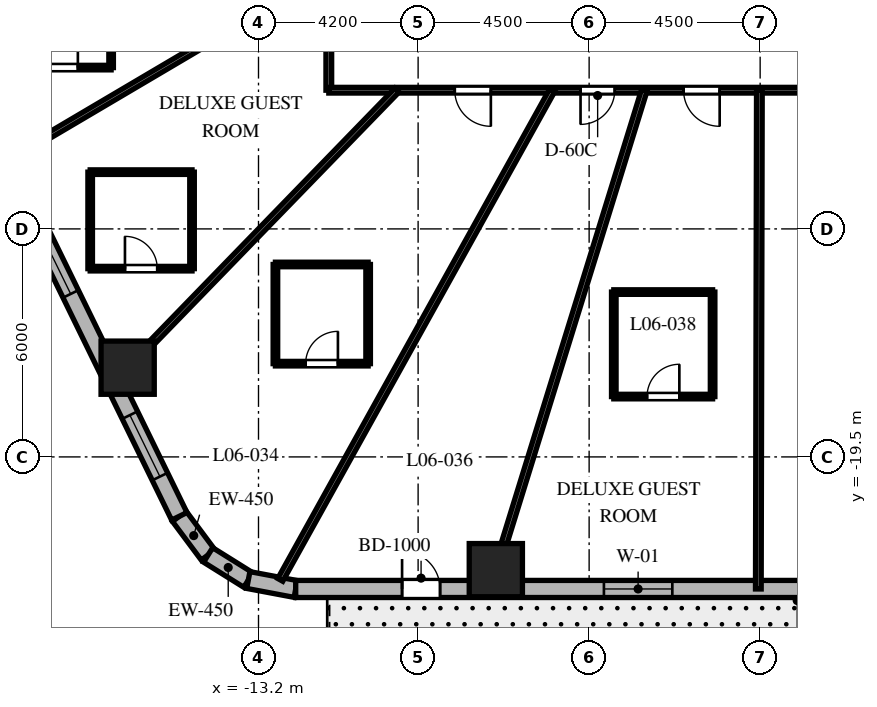
"""IFC4 building model, lengths in metres.
Left out: names, types, materials, properties, quantities, classifications, styles, units other than length and angle.
Written with IfcOpenShell. Run it as: python <this file> out.ifc"""

import sys

from ifc_helpers import new_model, si_unit, direction, frame, frame_2d, origin, origin_2d, place, context, subcontext, project, spatial, rectangle, extrude, element, fill, save


model = new_model("IFC4")
c1 = context("Model", 3, precision=1e-05, world=origin(), true_north=direction((0.0, 1.0)))
c2 = subcontext(c1, "Body", "Model", "MODEL_VIEW")
j1 = project(units=[si_unit("LENGTHUNIT", "METRE"), si_unit("PLANEANGLEUNIT", "RADIAN")], contexts=[c1])
p1 = place(None, origin())
s1 = spatial("IfcSite", under=j1, at=p1, CompositionType="ELEMENT")
p2 = place(p1, origin())
s2 = spatial("IfcBuilding", under=s1, at=p2, CompositionType="ELEMENT")
p3 = place(p2, frame((0.0, 0.0, 34.2)))
s3 = spatial("IfcBuildingStorey", under=s2, at=p3, CompositionType="ELEMENT", Elevation=34.2)
for number, where, z_axis, x_axis in (
    (1, (-6.955, -22.48, 0.0), (0.0, 0.0, 1.0), (1.0, 0.0, 0.0)),
    (2, (-16.643, -17.152, 0.0), (0.0, 0.0, 1.0), (1.0, 0.0, 0.0)),
):
    element("IfcColumn", number, at=place(p3, frame(where, z_axis=z_axis, x_axis=x_axis)), inside=s3, PredefinedType="COLUMN", context=c2, shape_type="SweptSolid", body=[
        extrude(rectangle(XDim=1.4, YDim=1.4, at=origin_2d()), origin(), (0.0, 0.0, 1.0), 3.7),
    ])
p4 = place(p3, frame((-15.284, -21.062, 0.0), z_axis=(0.0, 0.0, 1.0), x_axis=(0.597595366449, -0.801797841104, 0.0)))
e3 = element("IfcWall", 3, at=p4, inside=s3, PredefinedType="SOLIDWALL", context=c2, shape_type="SweptSolid", body=[
    extrude(rectangle(XDim=1.269, YDim=0.45, at=frame_2d((0.634, 0.0))), origin(), (0.0, 0.0, 1.0), 3.4),
])
p5 = place(p3, frame((-14.526, -22.08, 0.0), z_axis=(0.0, 0.0, 1.0), x_axis=(0.848185203596, -0.529699783275, 0.0)))
e4 = element("IfcWall", 4, at=p5, inside=s3, PredefinedType="SOLIDWALL", context=c2, shape_type="SweptSolid", body=[
    extrude(rectangle(XDim=1.247, YDim=0.45, at=frame_2d((0.624, 0.0))), origin(), (0.0, 0.0, 1.0), 3.4),
])
p6 = place(p3, frame((-13.468, -22.74, 0.0), z_axis=(0.0, 0.0, 1.0), x_axis=(0.982717174228, -0.185113358451, 0.0)))
e5 = element("IfcWall", 5, at=p6, inside=s3, PredefinedType="SOLIDWALL", context=c2, shape_type="SweptSolid", body=[
    extrude(rectangle(XDim=1.269, YDim=0.45, at=frame_2d((0.634, 0.0))), origin(), (0.0, 0.0, 1.0), 3.4),
])
p7 = place(p3, frame((-12.221, -22.975, 0.0), z_axis=(0.0, 0.0, 1.0), x_axis=(1.0, 0.0, 0.0)))
e6 = element("IfcWall", 6, at=p7, inside=s3, PredefinedType="SOLIDWALL", context=c2, shape_type="SweptSolid", body=[
    extrude(rectangle(XDim=26.389, YDim=0.45, at=frame_2d((13.195, 0.0))), origin(), (0.0, 0.0, 1.0), 3.4),
])
p8 = place(p7, frame((2.799, 0.0, 0.0)))
e7 = element("IfcOpeningElement", 7, at=p8, cuts=e6, PredefinedType="OPENING", context=c2, shape_type="SweptSolid", body=[
    extrude(rectangle(XDim=1.0, YDim=2.15, at=frame_2d((0.5, 1.075))), frame((0.0, 0.235, 0.0), z_axis=(0.0, -1.0, 0.0), x_axis=(1.0, 0.0, 0.0)), (0.0, 0.0, 1.0), 0.47),
])
p9 = place(p7, frame((8.11, 0.0, 0.8)))
e8 = element("IfcOpeningElement", 8, at=p9, cuts=e6, PredefinedType="OPENING", context=c2, shape_type="SweptSolid", body=[
    extrude(rectangle(XDim=1.8, YDim=1.8, at=frame_2d((0.9, 0.9))), frame((0.0, 0.235, 0.0), z_axis=(0.0, -1.0, 0.0), x_axis=(1.0, 0.0, 0.0)), (0.0, 0.0, 1.0), 0.47),
])
p10 = place(p7, frame((15.46, 0.0, 0.8)))
e9 = element("IfcOpeningElement", 9, at=p10, cuts=e6, PredefinedType="OPENING", context=c2, shape_type="SweptSolid", body=[
    extrude(rectangle(XDim=1.8, YDim=1.8, at=frame_2d((0.9, 0.9))), frame((0.0, 0.235, 0.0), z_axis=(0.0, -1.0, 0.0), x_axis=(1.0, 0.0, 0.0)), (0.0, 0.0, 1.0), 0.47),
])
p11 = place(p7, frame((22.938, 0.0, 0.8)))
e10 = element("IfcOpeningElement", 10, at=p11, cuts=e6, PredefinedType="OPENING", context=c2, shape_type="SweptSolid", body=[
    extrude(rectangle(XDim=1.8, YDim=1.8, at=frame_2d((0.9, 0.9))), frame((0.0, 0.235, 0.0), z_axis=(0.0, -1.0, 0.0), x_axis=(1.0, 0.0, 0.0)), (0.0, 0.0, 1.0), 0.47),
])
p12 = place(p3, frame((-24.336, -2.532, 0.0), z_axis=(0.0, 0.0, 1.0), x_axis=(0.438931326393, -0.898520612291, 0.0)))
e11 = element("IfcWall", 11, at=p12, inside=s3, PredefinedType="SOLIDWALL", context=c2, shape_type="SweptSolid", body=[
    extrude(rectangle(XDim=20.623, YDim=0.45, at=frame_2d((10.312, 0.0))), origin(), (0.0, 0.0, 1.0), 3.4),
])
p13 = place(p12, frame((1.214, 0.0, 0.8)))
e12 = element("IfcOpeningElement", 12, at=p13, cuts=e11, PredefinedType="OPENING", context=c2, shape_type="SweptSolid", body=[
    extrude(rectangle(XDim=1.8, YDim=1.8, at=frame_2d((0.9, 0.9))), frame((0.0, 0.235, 0.0), z_axis=(0.0, -1.0, 0.0), x_axis=(1.0, 0.0, 0.0)), (0.0, 0.0, 1.0), 0.47),
])
p14 = place(p12, frame((6.47, 0.0, 0.8)))
e13 = element("IfcOpeningElement", 13, at=p14, cuts=e11, PredefinedType="OPENING", context=c2, shape_type="SweptSolid", body=[
    extrude(rectangle(XDim=1.8, YDim=1.8, at=frame_2d((0.9, 0.9))), frame((0.0, 0.235, 0.0), z_axis=(0.0, -1.0, 0.0), x_axis=(1.0, 0.0, 0.0)), (0.0, 0.0, 1.0), 0.47),
])
p15 = place(p12, frame((12.311, 0.0, 0.8)))
e14 = element("IfcOpeningElement", 14, at=p15, cuts=e11, PredefinedType="OPENING", context=c2, shape_type="SweptSolid", body=[
    extrude(rectangle(XDim=1.8, YDim=1.8, at=frame_2d((0.9, 0.9))), frame((0.0, 0.235, 0.0), z_axis=(0.0, -1.0, 0.0), x_axis=(1.0, 0.0, 0.0)), (0.0, 0.0, 1.0), 0.47),
])
p16 = place(p12, frame((17.66, 0.0, 0.8)))
e15 = element("IfcOpeningElement", 15, at=p16, cuts=e11, PredefinedType="OPENING", context=c2, shape_type="SweptSolid", body=[
    extrude(rectangle(XDim=1.8, YDim=1.8, at=frame_2d((0.9, 0.9))), frame((0.0, 0.235, 0.0), z_axis=(0.0, -1.0, 0.0), x_axis=(1.0, 0.0, 0.0)), (0.0, 0.0, 1.0), 0.47),
])
p17 = place(p3, frame((-11.35, -9.85, 0.0), z_axis=(0.0, 0.0, 1.0), x_axis=(0.0, 1.0, 0.0)))
e16 = element("IfcWall", 16, at=p17, inside=s3, PredefinedType="PARTITIONING", context=c2, shape_type="SweptSolid", body=[
    extrude(rectangle(XDim=19.7, YDim=0.15, at=frame_2d((9.85, 0.0))), origin(), (0.0, 0.0, 1.0), 2.84),
])
p18 = place(p17, frame((16.714, 0.0, 0.0)))
e17 = element("IfcOpeningElement", 17, at=p18, cuts=e16, PredefinedType="OPENING", context=c2, shape_type="SweptSolid", body=[
    extrude(rectangle(XDim=0.95, YDim=2.03, at=frame_2d((0.475, 1.015))), frame((0.0, 0.085, 0.0), z_axis=(0.0, -1.0, 0.0), x_axis=(1.0, 0.0, 0.0)), (0.0, 0.0, 1.0), 0.17),
])
p19 = place(p17, frame((12.932, 0.0, 0.0)))
e18 = element("IfcOpeningElement", 18, at=p19, cuts=e16, PredefinedType="OPENING", context=c2, shape_type="SweptSolid", body=[
    extrude(rectangle(XDim=0.95, YDim=2.03, at=frame_2d((0.475, 1.015))), frame((0.0, 0.085, 0.0), z_axis=(0.0, -1.0, 0.0), x_axis=(1.0, 0.0, 0.0)), (0.0, 0.0, 1.0), 0.17),
])
p20 = place(p17, frame((8.838, 0.0, 0.0)))
e19 = element("IfcOpeningElement", 19, at=p20, cuts=e16, PredefinedType="OPENING", context=c2, shape_type="SweptSolid", body=[
    extrude(rectangle(XDim=0.95, YDim=2.03, at=frame_2d((0.475, 1.015))), frame((0.0, 0.085, 0.0), z_axis=(0.0, -1.0, 0.0), x_axis=(1.0, 0.0, 0.0)), (0.0, 0.0, 1.0), 0.17),
])
p21 = place(p17, frame((4.461, 0.0, 0.0)))
e20 = element("IfcOpeningElement", 20, at=p21, cuts=e16, PredefinedType="OPENING", context=c2, shape_type="SweptSolid", body=[
    extrude(rectangle(XDim=0.95, YDim=2.03, at=frame_2d((0.475, 1.015))), frame((0.0, 0.085, 0.0), z_axis=(0.0, -1.0, 0.0), x_axis=(1.0, 0.0, 0.0)), (0.0, 0.0, 1.0), 0.17),
])
p22 = place(p17, frame((1.221, 0.0, 0.0)))
e21 = element("IfcOpeningElement", 21, at=p22, cuts=e16, PredefinedType="OPENING", context=c2, shape_type="SweptSolid", body=[
    extrude(rectangle(XDim=0.95, YDim=2.03, at=frame_2d((0.475, 1.015))), frame((0.0, 0.085, 0.0), z_axis=(0.0, -1.0, 0.0), x_axis=(1.0, 0.0, 0.0)), (0.0, 0.0, 1.0), 0.17),
])
p23 = place(p3, frame((11.35, -9.85, 0.0), z_axis=(0.0, 0.0, 1.0), x_axis=(-1.0, 0.0, 0.0)))
e22 = element("IfcWall", 22, at=p23, inside=s3, PredefinedType="PARTITIONING", context=c2, shape_type="SweptSolid", body=[
    extrude(rectangle(XDim=22.7, YDim=0.15, at=frame_2d((11.35, 0.0))), origin(), (0.0, 0.0, 1.0), 2.84),
])
p24 = place(p23, frame((18.436, 0.0, 0.0)))
e23 = element("IfcOpeningElement", 23, at=p24, cuts=e22, PredefinedType="OPENING", context=c2, shape_type="SweptSolid", body=[
    extrude(rectangle(XDim=0.95, YDim=2.03, at=frame_2d((0.475, 1.015))), frame((0.0, 0.085, 0.0), z_axis=(0.0, -1.0, 0.0), x_axis=(1.0, 0.0, 0.0)), (0.0, 0.0, 1.0), 0.17),
])
p25 = place(p23, frame((15.176, 0.0, 0.0)))
e24 = element("IfcOpeningElement", 24, at=p25, cuts=e22, PredefinedType="OPENING", context=c2, shape_type="SweptSolid", body=[
    extrude(rectangle(XDim=0.9, YDim=2.03, at=frame_2d((0.45, 1.015))), frame((0.0, 0.085, 0.0), z_axis=(0.0, -1.0, 0.0), x_axis=(1.0, 0.0, 0.0)), (0.0, 0.0, 1.0), 0.17),
])
p26 = place(p23, frame((12.415, 0.0, 0.0)))
e25 = element("IfcOpeningElement", 25, at=p26, cuts=e22, PredefinedType="OPENING", context=c2, shape_type="SweptSolid", body=[
    extrude(rectangle(XDim=0.95, YDim=2.03, at=frame_2d((0.475, 1.015))), frame((0.0, 0.085, 0.0), z_axis=(0.0, -1.0, 0.0), x_axis=(1.0, 0.0, 0.0)), (0.0, 0.0, 1.0), 0.17),
])
p27 = place(p23, frame((8.925, 0.0, 0.0)))
e26 = element("IfcOpeningElement", 26, at=p27, cuts=e22, PredefinedType="OPENING", context=c2, shape_type="SweptSolid", body=[
    extrude(rectangle(XDim=0.95, YDim=2.03, at=frame_2d((0.475, 1.015))), frame((0.0, 0.085, 0.0), z_axis=(0.0, -1.0, 0.0), x_axis=(1.0, 0.0, 0.0)), (0.0, 0.0, 1.0), 0.17),
])
p28 = place(p23, frame((5.463, 0.0, 0.0)))
e27 = element("IfcOpeningElement", 27, at=p28, cuts=e22, PredefinedType="OPENING", context=c2, shape_type="SweptSolid", body=[
    extrude(rectangle(XDim=0.95, YDim=2.03, at=frame_2d((0.475, 1.015))), frame((0.0, 0.085, 0.0), z_axis=(0.0, -1.0, 0.0), x_axis=(1.0, 0.0, 0.0)), (0.0, 0.0, 1.0), 0.17),
])
p29 = place(p23, frame((1.91, 0.0, 0.0)))
e28 = element("IfcOpeningElement", 28, at=p29, cuts=e22, PredefinedType="OPENING", context=c2, shape_type="SweptSolid", body=[
    extrude(rectangle(XDim=0.9, YDim=2.03, at=frame_2d((0.45, 1.015))), frame((0.0, 0.085, 0.0), z_axis=(0.0, -1.0, 0.0), x_axis=(1.0, 0.0, 0.0)), (0.0, 0.0, 1.0), 0.17),
])
p30 = place(p3, frame((-11.35, -6.698, 0.0), z_axis=(0.0, 0.0, 1.0), x_axis=(-0.861198232886, -0.508269223614, 0.0)))
e29 = element("IfcWall", 29, at=p30, inside=s3, PredefinedType="PARTITIONING", context=c2, shape_type="SweptSolid", body=[
    extrude(rectangle(XDim=9.87, YDim=0.15, at=frame_2d((4.935, 0.0))), origin(), (0.0, 0.0, 1.0), 2.54),
])
p31 = place(p3, frame((-9.558, -9.85, 0.0), z_axis=(0.0, 0.0, 1.0), x_axis=(-0.69638346089, -0.717669893056, 0.0)))
e30 = element("IfcWall", 30, at=p31, inside=s3, PredefinedType="PARTITIONING", context=c2, shape_type="SweptSolid", body=[
    extrude(rectangle(XDim=10.701, YDim=0.15, at=frame_2d((5.351, 0.0))), origin(), (0.0, 0.0, 1.0), 2.54),
])
p32 = place(p3, frame((-5.471, -9.85, 0.0), z_axis=(0.0, 0.0, 1.0), x_axis=(-0.48553323157, -0.874218211341, 0.0)))
e31 = element("IfcWall", 31, at=p32, inside=s3, PredefinedType="PARTITIONING", context=c2, shape_type="SweptSolid", body=[
    extrude(rectangle(XDim=14.74, YDim=0.15, at=frame_2d((7.37, 0.0))), origin(), (0.0, 0.0, 1.0), 2.54),
])
p33 = place(p3, frame((-3.048, -9.85, 0.0), z_axis=(0.0, 0.0, 1.0), x_axis=(-0.295553992761, -0.955326037206, 0.0)))
e32 = element("IfcWall", 32, at=p33, inside=s3, PredefinedType="PARTITIONING", context=c2, shape_type="SweptSolid", body=[
    extrude(rectangle(XDim=13.739, YDim=0.15, at=frame_2d((6.869, 0.0))), origin(), (0.0, 0.0, 1.0), 2.54),
])
p34 = place(p3, frame((-0.021, -9.85, 0.0), z_axis=(0.0, 0.0, 1.0), x_axis=(-0.002064727742, -0.999997868447, 0.0)))
e33 = element("IfcWall", 33, at=p34, inside=s3, PredefinedType="PARTITIONING", context=c2, shape_type="SweptSolid", body=[
    extrude(rectangle(XDim=13.125, YDim=0.15, at=frame_2d((6.562, 0.0))), origin(), (0.0, 0.0, 1.0), 2.54),
])
p35 = place(p3, frame((-19.678, -9.255, 0.0), z_axis=(0.0, 0.0, 1.0), x_axis=(1.0, 0.0, 0.0)))
e34 = element("IfcWall", 34, at=p35, inside=s3, PredefinedType="PARTITIONING", context=c2, shape_type="SweptSolid", body=[
    extrude(rectangle(XDim=2.6, YDim=0.12, at=frame_2d((1.3, 0.0))), origin(), (0.0, 0.0, 1.0), 3.4),
])
p36 = place(p35, frame((0.875, 0.0, 0.0)))
e35 = element("IfcOpeningElement", 35, at=p36, cuts=e34, PredefinedType="OPENING", context=c2, shape_type="SweptSolid", body=[
    extrude(rectangle(XDim=0.85, YDim=2.03, at=frame_2d((0.425, 1.015))), frame((0.0, 0.07, 0.0), z_axis=(0.0, -1.0, 0.0), x_axis=(1.0, 0.0, 0.0)), (0.0, 0.0, 1.0), 0.14),
])
p37 = place(p3, frame((-17.078, -9.255, 0.0), z_axis=(0.0, 0.0, 1.0), x_axis=(0.0, 1.0, 0.0)))
e36 = element("IfcWall", 36, at=p37, inside=s3, PredefinedType="PARTITIONING", context=c2, shape_type="SweptSolid", body=[
    extrude(rectangle(XDim=2.75, YDim=0.12, at=frame_2d((1.375, 0.0))), origin(), (0.0, 0.0, 1.0), 2.84),
])
p38 = place(p3, frame((-17.629, -14.546, 0.0), z_axis=(0.0, 0.0, 1.0), x_axis=(1.0, 0.0, 0.0)))
e37 = element("IfcWall", 37, at=p38, inside=s3, PredefinedType="PARTITIONING", context=c2, shape_type="SweptSolid", body=[
    extrude(rectangle(XDim=2.68, YDim=0.12, at=frame_2d((1.34, 0.0))), origin(), (0.0, 0.0, 1.0), 3.4),
])
p39 = place(p38, frame((0.915, 0.0, 0.0)))
e38 = element("IfcOpeningElement", 38, at=p39, cuts=e37, PredefinedType="OPENING", context=c2, shape_type="SweptSolid", body=[
    extrude(rectangle(XDim=0.85, YDim=2.03, at=frame_2d((0.425, 1.015))), frame((0.0, 0.07, 0.0), z_axis=(0.0, -1.0, 0.0), x_axis=(1.0, 0.0, 0.0)), (0.0, 0.0, 1.0), 0.14),
])
p40 = place(p3, frame((-14.949, -14.546, 0.0), z_axis=(0.0, 0.0, 1.0), x_axis=(0.0, 1.0, 0.0)))
e39 = element("IfcWall", 39, at=p40, inside=s3, PredefinedType="PARTITIONING", context=c2, shape_type="SweptSolid", body=[
    extrude(rectangle(XDim=2.54, YDim=0.12, at=frame_2d((1.27, 0.0))), origin(), (0.0, 0.0, 1.0), 2.927),
])
p41 = place(p3, frame((-14.949, -12.006, 0.0), z_axis=(0.0, 0.0, 1.0), x_axis=(-1.0, 0.0, 0.0)))
e40 = element("IfcWall", 40, at=p41, inside=s3, PredefinedType="PARTITIONING", context=c2, shape_type="SweptSolid", body=[
    extrude(rectangle(XDim=2.68, YDim=0.12, at=frame_2d((1.34, 0.0))), origin(), (0.0, 0.0, 1.0), 2.927),
])
p42 = place(p3, frame((-17.629, -12.006, 0.0), z_axis=(0.0, 0.0, 1.0), x_axis=(0.0, -1.0, 0.0)))
e41 = element("IfcWall", 41, at=p42, inside=s3, PredefinedType="PARTITIONING", context=c2, shape_type="SweptSolid", body=[
    extrude(rectangle(XDim=2.54, YDim=0.12, at=frame_2d((1.27, 0.0))), origin(), (0.0, 0.0, 1.0), 2.54),
])
p43 = place(p3, frame((-12.755, -17.046, 0.0), z_axis=(0.0, 0.0, 1.0), x_axis=(1.0, 0.0, 0.0)))
e42 = element("IfcWall", 42, at=p43, inside=s3, PredefinedType="PARTITIONING", context=c2, shape_type="SweptSolid", body=[
    extrude(rectangle(XDim=2.44, YDim=0.12, at=frame_2d((1.22, 0.0))), origin(), (0.0, 0.0, 1.0), 3.4),
])
p44 = place(p43, frame((0.795, 0.0, 0.0)))
e43 = element("IfcOpeningElement", 43, at=p44, cuts=e42, PredefinedType="OPENING", context=c2, shape_type="SweptSolid", body=[
    extrude(rectangle(XDim=0.85, YDim=2.03, at=frame_2d((0.425, 1.015))), frame((0.0, 0.07, 0.0), z_axis=(0.0, -1.0, 0.0), x_axis=(1.0, 0.0, 0.0)), (0.0, 0.0, 1.0), 0.14),
])
p45 = place(p3, frame((-10.315, -17.046, 0.0), z_axis=(0.0, 0.0, 1.0), x_axis=(0.0, 1.0, 0.0)))
e44 = element("IfcWall", 44, at=p45, inside=s3, PredefinedType="PARTITIONING", context=c2, shape_type="SweptSolid", body=[
    extrude(rectangle(XDim=2.61, YDim=0.12, at=frame_2d((1.305, 0.0))), origin(), (0.0, 0.0, 1.0), 2.972),
])
p46 = place(p3, frame((-10.315, -14.436, 0.0), z_axis=(0.0, 0.0, 1.0), x_axis=(-1.0, 0.0, 0.0)))
e45 = element("IfcWall", 45, at=p46, inside=s3, PredefinedType="PARTITIONING", context=c2, shape_type="SweptSolid", body=[
    extrude(rectangle(XDim=2.44, YDim=0.12, at=frame_2d((1.22, 0.0))), origin(), (0.0, 0.0, 1.0), 3.4),
])
p47 = place(p3, frame((-12.755, -14.436, 0.0), z_axis=(0.0, 0.0, 1.0), x_axis=(0.0, -1.0, 0.0)))
e46 = element("IfcWall", 46, at=p47, inside=s3, PredefinedType="PARTITIONING", context=c2, shape_type="SweptSolid", body=[
    extrude(rectangle(XDim=2.61, YDim=0.12, at=frame_2d((1.305, 0.0))), origin(), (0.0, 0.0, 1.0), 2.972),
])
p48 = place(p3, frame((-3.851, -17.912, 0.0), z_axis=(0.0, 0.0, 1.0), x_axis=(1.0, 0.0, 0.0)))
e47 = element("IfcWall", 47, at=p48, inside=s3, PredefinedType="PARTITIONING", context=c2, shape_type="SweptSolid", body=[
    extrude(rectangle(XDim=2.6, YDim=0.12, at=frame_2d((1.3, 0.0))), origin(), (0.0, 0.0, 1.0), 3.4),
])
p49 = place(p48, frame((0.875, 0.0, 0.0)))
e48 = element("IfcOpeningElement", 48, at=p49, cuts=e47, PredefinedType="OPENING", context=c2, shape_type="SweptSolid", body=[
    extrude(rectangle(XDim=0.85, YDim=2.03, at=frame_2d((0.425, 1.015))), frame((0.0, 0.07, 0.0), z_axis=(0.0, -1.0, 0.0), x_axis=(1.0, 0.0, 0.0)), (0.0, 0.0, 1.0), 0.14),
])
p50 = place(p3, frame((-1.251, -17.912, 0.0), z_axis=(0.0, 0.0, 1.0), x_axis=(0.0, 1.0, 0.0)))
e49 = element("IfcWall", 49, at=p50, inside=s3, PredefinedType="PARTITIONING", context=c2, shape_type="SweptSolid", body=[
    extrude(rectangle(XDim=2.75, YDim=0.12, at=frame_2d((1.375, 0.0))), origin(), (0.0, 0.0, 1.0), 2.841),
])
p51 = place(p3, frame((-1.251, -15.162, 0.0), z_axis=(0.0, 0.0, 1.0), x_axis=(-1.0, 0.0, 0.0)))
e50 = element("IfcWall", 50, at=p51, inside=s3, PredefinedType="PARTITIONING", context=c2, shape_type="SweptSolid", body=[
    extrude(rectangle(XDim=2.6, YDim=0.12, at=frame_2d((1.3, 0.0))), origin(), (0.0, 0.0, 1.0), 3.4),
])
p52 = place(p3, frame((-3.851, -15.162, 0.0), z_axis=(0.0, 0.0, 1.0), x_axis=(0.0, -1.0, 0.0)))
e51 = element("IfcWall", 51, at=p52, inside=s3, PredefinedType="PARTITIONING", context=c2, shape_type="SweptSolid", body=[
    extrude(rectangle(XDim=2.75, YDim=0.12, at=frame_2d((1.375, 0.0))), origin(), (0.0, 0.0, 1.0), 2.841),
])
p53 = place(p8, origin())
e52 = element("IfcDoor", 52, at=p53, inside=s3, OperationType="SINGLE_SWING_LEFT", PredefinedType="DOOR", context=c2, shape_type="SweptSolid", body=[
    extrude(rectangle(XDim=1.0, YDim=2.15, at=frame_2d((0.5, 1.075))), frame((0.0, 0.025, 0.0), z_axis=(0.0, -1.0, 0.0), x_axis=(1.0, 0.0, 0.0)), (0.0, 0.0, 1.0), 0.05),
])
fill(e7, e52)
p54 = place(p9, origin())
e53 = element("IfcWindow", 53, at=p54, inside=s3, PartitioningType="SINGLE_PANEL", PredefinedType="WINDOW", context=c2, shape_type="SweptSolid", body=[
    extrude(rectangle(XDim=1.8, YDim=1.8, at=frame_2d((0.9, 0.9))), frame((0.0, 0.03, 0.0), z_axis=(0.0, -1.0, 0.0), x_axis=(1.0, 0.0, 0.0)), (0.0, 0.0, 1.0), 0.06),
])
fill(e8, e53)
p55 = place(p15, origin())
e54 = element("IfcWindow", 54, at=p55, inside=s3, PartitioningType="SINGLE_PANEL", PredefinedType="WINDOW", context=c2, shape_type="SweptSolid", body=[
    extrude(rectangle(XDim=1.8, YDim=1.8, at=frame_2d((0.9, 0.9))), frame((0.0, 0.03, 0.0), z_axis=(0.0, -1.0, 0.0), x_axis=(1.0, 0.0, 0.0)), (0.0, 0.0, 1.0), 0.06),
])
fill(e14, e54)
p56 = place(p16, origin())
e55 = element("IfcWindow", 55, at=p56, inside=s3, PartitioningType="SINGLE_PANEL", PredefinedType="WINDOW", context=c2, shape_type="SweptSolid", body=[
    extrude(rectangle(XDim=1.8, YDim=1.8, at=frame_2d((0.9, 0.9))), frame((0.0, 0.03, 0.0), z_axis=(0.0, -1.0, 0.0), x_axis=(1.0, 0.0, 0.0)), (0.0, 0.0, 1.0), 0.06),
])
fill(e15, e55)
p57 = place(p36, origin())
e56 = element("IfcDoor", 56, at=p57, inside=s3, OperationType="SINGLE_SWING_RIGHT", PredefinedType="DOOR", context=c2, shape_type="SweptSolid", body=[
    extrude(rectangle(XDim=0.85, YDim=2.03, at=frame_2d((0.425, 1.015))), frame((0.0, 0.025, 0.0), z_axis=(0.0, -1.0, 0.0), x_axis=(1.0, 0.0, 0.0)), (0.0, 0.0, 1.0), 0.05),
])
fill(e35, e56)
p58 = place(p39, origin())
e57 = element("IfcDoor", 57, at=p58, inside=s3, OperationType="SINGLE_SWING_LEFT", PredefinedType="DOOR", context=c2, shape_type="SweptSolid", body=[
    extrude(rectangle(XDim=0.85, YDim=2.03, at=frame_2d((0.425, 1.015))), frame((0.0, 0.025, 0.0), z_axis=(0.0, -1.0, 0.0), x_axis=(1.0, 0.0, 0.0)), (0.0, 0.0, 1.0), 0.05),
])
fill(e38, e57)
p59 = place(p24, origin())
e58 = element("IfcDoor", 58, at=p59, inside=s3, OperationType="SINGLE_SWING_LEFT", PredefinedType="DOOR", context=c2, shape_type="SweptSolid", body=[
    extrude(rectangle(XDim=0.95, YDim=2.03, at=frame_2d((0.475, 1.015))), frame((0.0, 0.025, 0.0), z_axis=(0.0, -1.0, 0.0), x_axis=(1.0, 0.0, 0.0)), (0.0, 0.0, 1.0), 0.05),
])
fill(e23, e58)
p60 = place(p44, origin())
e59 = element("IfcDoor", 59, at=p60, inside=s3, OperationType="SINGLE_SWING_RIGHT", PredefinedType="DOOR", context=c2, shape_type="SweptSolid", body=[
    extrude(rectangle(XDim=0.85, YDim=2.03, at=frame_2d((0.425, 1.015))), frame((0.0, 0.025, 0.0), z_axis=(0.0, -1.0, 0.0), x_axis=(1.0, 0.0, 0.0)), (0.0, 0.0, 1.0), 0.05),
])
fill(e43, e59)
p61 = place(p25, origin())
e60 = element("IfcDoor", 60, at=p61, inside=s3, OperationType="SINGLE_SWING_RIGHT", PredefinedType="DOOR", context=c2, shape_type="SweptSolid", body=[
    extrude(rectangle(XDim=0.9, YDim=2.03, at=frame_2d((0.45, 1.015))), frame((0.0, 0.025, 0.0), z_axis=(0.0, -1.0, 0.0), x_axis=(1.0, 0.0, 0.0)), (0.0, 0.0, 1.0), 0.05),
])
fill(e24, e60)
p62 = place(p26, origin())
e61 = element("IfcDoor", 61, at=p62, inside=s3, OperationType="SINGLE_SWING_LEFT", PredefinedType="DOOR", context=c2, shape_type="SweptSolid", body=[
    extrude(rectangle(XDim=0.95, YDim=2.03, at=frame_2d((0.475, 1.015))), frame((0.0, 0.025, 0.0), z_axis=(0.0, -1.0, 0.0), x_axis=(1.0, 0.0, 0.0)), (0.0, 0.0, 1.0), 0.05),
])
fill(e25, e61)
p63 = place(p49, origin())
e62 = element("IfcDoor", 62, at=p63, inside=s3, OperationType="SINGLE_SWING_RIGHT", PredefinedType="DOOR", context=c2, shape_type="SweptSolid", body=[
    extrude(rectangle(XDim=0.85, YDim=2.03, at=frame_2d((0.425, 1.015))), frame((0.0, 0.025, 0.0), z_axis=(0.0, -1.0, 0.0), x_axis=(1.0, 0.0, 0.0)), (0.0, 0.0, 1.0), 0.05),
])
fill(e48, e62)
save(model, sys.argv[1])
